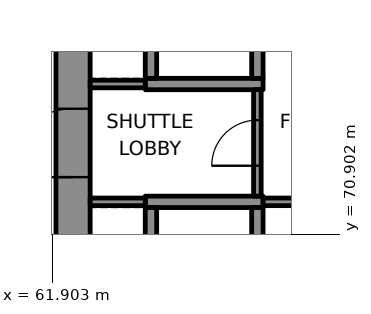
"""IFC4 building model, lengths in metres.
Left out: names, types, materials, properties, quantities, classifications, styles, units other than length and angle.
Written with IfcOpenShell. Run it as: python <this file> out.ifc"""

import sys

from ifc_helpers import new_model, si_unit, direction, frame, frame_2d, origin, place, context, subcontext, project, spatial, rectangle, extrude, element, fill, save


model = new_model("IFC4")
c1 = context("Model", 3, precision=1e-05, world=origin(), true_north=direction((0.0, 1.0)))
c2 = subcontext(c1, "Body", "Model", "MODEL_VIEW")
j1 = project(units=[si_unit("LENGTHUNIT", "METRE"), si_unit("PLANEANGLEUNIT", "RADIAN")], contexts=[c1])
p1 = place(None, origin())
s1 = spatial("IfcSite", under=j1, at=p1, CompositionType="ELEMENT")
p2 = place(p1, origin())
s2 = spatial("IfcBuilding", under=s1, at=p2, CompositionType="ELEMENT")
p3 = place(p2, frame((0.0, 0.0, 31.0)))
s3 = spatial("IfcBuildingStorey", under=s2, at=p3, CompositionType="ELEMENT", Elevation=31.0)
p4 = place(p3, frame((62.45, 66.9, 0.0), z_axis=(0.0, 0.0, 1.0), x_axis=(0.0, 1.0, 0.0)))
e1 = element("IfcWall", 1, at=p4, inside=s3, PredefinedType="SHEAR", context=c2, shape_type="SweptSolid", body=[
    extrude(rectangle(XDim=16.2, YDim=0.9, at=frame_2d((8.1, 0.0))), origin(), (0.0, 0.0, 1.0), 4.05),
])
p5 = place(p4, frame((5.5, 0.0, 0.0)))
e2 = element("IfcOpeningElement", 2, at=p5, cuts=e1, PredefinedType="OPENING", context=c2, shape_type="SweptSolid", body=[
    extrude(rectangle(XDim=1.8, YDim=2.1, at=frame_2d((0.9, 1.05))), frame((0.0, 0.46, 0.0), z_axis=(0.0, -1.0, 0.0), x_axis=(1.0, 0.0, 0.0)), (0.0, 0.0, 1.0), 0.92),
])
for number, where, z_axis, x_axis in (
    (3, (64.35, 71.75, 0.0), (0.0, 0.0, 1.0), (1.0, 0.0, 0.0)),
    (4, (64.35, 74.85, 0.0), (0.0, 0.0, 1.0), (1.0, 0.0, 0.0)),
):
    element("IfcWall", number, at=place(p3, frame(where, z_axis=z_axis, x_axis=x_axis)), inside=s3, PredefinedType="SHEAR", context=c2, shape_type="SweptSolid", body=[
        extrude(rectangle(XDim=3.1, YDim=0.3, at=frame_2d((1.55, 0.0))), origin(), (0.0, 0.0, 1.0), 4.05),
    ])
for number, where, z_axis, x_axis in (
    (5, (64.5, 69.0, 0.0), (0.0, 0.0, 1.0), (0.0, 1.0, 0.0)),
    (6, (64.5, 75.0, 0.0), (0.0, 0.0, 1.0), (0.0, 1.0, 0.0)),
    (7, (67.3, 69.0, 0.0), (0.0, 0.0, 1.0), (0.0, 1.0, 0.0)),
    (8, (67.3, 75.0, 0.0), (0.0, 0.0, 1.0), (0.0, 1.0, 0.0)),
):
    element("IfcWall", number, at=place(p3, frame(where, z_axis=z_axis, x_axis=x_axis)), inside=s3, PredefinedType="SHEAR", context=c2, shape_type="SweptSolid", body=[
        extrude(rectangle(XDim=2.6, YDim=0.3, at=frame_2d((1.3, 0.0))), origin(), (0.0, 0.0, 1.0), 4.05),
    ])
p6 = place(p3, frame((71.348, 110.424, 0.0), z_axis=(0.0, 0.0, 1.0), x_axis=(-0.500000550228, -0.86602508611, 0.0)))
e9 = element("IfcWall", 9, at=p6, inside=s3, PredefinedType="SOLIDWALL", context=c2, shape_type="SweptSolid", body=[
    extrude(rectangle(XDim=57.704, YDim=0.3, at=frame_2d((28.852, 0.0))), origin(), (0.0, 0.0, 1.0), 4.05),
])
p7 = place(p6, frame((0.89, 0.0, 0.8)))
e10 = element("IfcOpeningElement", 10, at=p7, cuts=e9, PredefinedType="OPENING", context=c2, shape_type="SweptSolid", body=[
    extrude(rectangle(XDim=3.0, YDim=2.4, at=frame_2d((1.5, 1.2))), frame((0.0, 0.16, 0.0), z_axis=(0.0, -1.0, 0.0), x_axis=(1.0, 0.0, 0.0)), (0.0, 0.0, 1.0), 0.32),
])
p8 = place(p6, frame((4.67, 0.0, 0.8)))
e11 = element("IfcOpeningElement", 11, at=p8, cuts=e9, PredefinedType="OPENING", context=c2, shape_type="SweptSolid", body=[
    extrude(rectangle(XDim=3.0, YDim=2.4, at=frame_2d((1.5, 1.2))), frame((0.0, 0.16, 0.0), z_axis=(0.0, -1.0, 0.0), x_axis=(1.0, 0.0, 0.0)), (0.0, 0.0, 1.0), 0.32),
])
p9 = place(p6, frame((8.451, 0.0, 0.8)))
e12 = element("IfcOpeningElement", 12, at=p9, cuts=e9, PredefinedType="OPENING", context=c2, shape_type="SweptSolid", body=[
    extrude(rectangle(XDim=3.0, YDim=2.4, at=frame_2d((1.5, 1.2))), frame((0.0, 0.16, 0.0), z_axis=(0.0, -1.0, 0.0), x_axis=(1.0, 0.0, 0.0)), (0.0, 0.0, 1.0), 0.32),
])
p10 = place(p6, frame((12.231, 0.0, 0.8)))
e13 = element("IfcOpeningElement", 13, at=p10, cuts=e9, PredefinedType="OPENING", context=c2, shape_type="SweptSolid", body=[
    extrude(rectangle(XDim=3.0, YDim=2.4, at=frame_2d((1.5, 1.2))), frame((0.0, 0.16, 0.0), z_axis=(0.0, -1.0, 0.0), x_axis=(1.0, 0.0, 0.0)), (0.0, 0.0, 1.0), 0.32),
])
p11 = place(p6, frame((16.011, 0.0, 0.8)))
e14 = element("IfcOpeningElement", 14, at=p11, cuts=e9, PredefinedType="OPENING", context=c2, shape_type="SweptSolid", body=[
    extrude(rectangle(XDim=3.0, YDim=2.4, at=frame_2d((1.5, 1.2))), frame((0.0, 0.16, 0.0), z_axis=(0.0, -1.0, 0.0), x_axis=(1.0, 0.0, 0.0)), (0.0, 0.0, 1.0), 0.32),
])
p12 = place(p6, frame((19.792, 0.0, 0.8)))
e15 = element("IfcOpeningElement", 15, at=p12, cuts=e9, PredefinedType="OPENING", context=c2, shape_type="SweptSolid", body=[
    extrude(rectangle(XDim=3.0, YDim=2.4, at=frame_2d((1.5, 1.2))), frame((0.0, 0.16, 0.0), z_axis=(0.0, -1.0, 0.0), x_axis=(1.0, 0.0, 0.0)), (0.0, 0.0, 1.0), 0.32),
])
p13 = place(p6, frame((23.572, 0.0, 0.8)))
e16 = element("IfcOpeningElement", 16, at=p13, cuts=e9, PredefinedType="OPENING", context=c2, shape_type="SweptSolid", body=[
    extrude(rectangle(XDim=3.0, YDim=2.4, at=frame_2d((1.5, 1.2))), frame((0.0, 0.16, 0.0), z_axis=(0.0, -1.0, 0.0), x_axis=(1.0, 0.0, 0.0)), (0.0, 0.0, 1.0), 0.32),
])
p14 = place(p6, frame((27.352, 0.0, 0.8)))
e17 = element("IfcOpeningElement", 17, at=p14, cuts=e9, PredefinedType="OPENING", context=c2, shape_type="SweptSolid", body=[
    extrude(rectangle(XDim=3.0, YDim=2.4, at=frame_2d((1.5, 1.2))), frame((0.0, 0.16, 0.0), z_axis=(0.0, -1.0, 0.0), x_axis=(1.0, 0.0, 0.0)), (0.0, 0.0, 1.0), 0.32),
])
p15 = place(p6, frame((31.132, 0.0, 0.8)))
e18 = element("IfcOpeningElement", 18, at=p15, cuts=e9, PredefinedType="OPENING", context=c2, shape_type="SweptSolid", body=[
    extrude(rectangle(XDim=3.0, YDim=2.4, at=frame_2d((1.5, 1.2))), frame((0.0, 0.16, 0.0), z_axis=(0.0, -1.0, 0.0), x_axis=(1.0, 0.0, 0.0)), (0.0, 0.0, 1.0), 0.32),
])
p16 = place(p6, frame((34.913, 0.0, 0.8)))
e19 = element("IfcOpeningElement", 19, at=p16, cuts=e9, PredefinedType="OPENING", context=c2, shape_type="SweptSolid", body=[
    extrude(rectangle(XDim=3.0, YDim=2.4, at=frame_2d((1.5, 1.2))), frame((0.0, 0.16, 0.0), z_axis=(0.0, -1.0, 0.0), x_axis=(1.0, 0.0, 0.0)), (0.0, 0.0, 1.0), 0.32),
])
p17 = place(p6, frame((38.693, 0.0, 0.8)))
e20 = element("IfcOpeningElement", 20, at=p17, cuts=e9, PredefinedType="OPENING", context=c2, shape_type="SweptSolid", body=[
    extrude(rectangle(XDim=3.0, YDim=2.4, at=frame_2d((1.5, 1.2))), frame((0.0, 0.16, 0.0), z_axis=(0.0, -1.0, 0.0), x_axis=(1.0, 0.0, 0.0)), (0.0, 0.0, 1.0), 0.32),
])
p18 = place(p6, frame((42.473, 0.0, 0.8)))
e21 = element("IfcOpeningElement", 21, at=p18, cuts=e9, PredefinedType="OPENING", context=c2, shape_type="SweptSolid", body=[
    extrude(rectangle(XDim=3.0, YDim=2.4, at=frame_2d((1.5, 1.2))), frame((0.0, 0.16, 0.0), z_axis=(0.0, -1.0, 0.0), x_axis=(1.0, 0.0, 0.0)), (0.0, 0.0, 1.0), 0.32),
])
p19 = place(p6, frame((46.253, 0.0, 0.8)))
e22 = element("IfcOpeningElement", 22, at=p19, cuts=e9, PredefinedType="OPENING", context=c2, shape_type="SweptSolid", body=[
    extrude(rectangle(XDim=3.0, YDim=2.4, at=frame_2d((1.5, 1.2))), frame((0.0, 0.16, 0.0), z_axis=(0.0, -1.0, 0.0), x_axis=(1.0, 0.0, 0.0)), (0.0, 0.0, 1.0), 0.32),
])
p20 = place(p6, frame((50.033, 0.0, 0.8)))
e23 = element("IfcOpeningElement", 23, at=p20, cuts=e9, PredefinedType="OPENING", context=c2, shape_type="SweptSolid", body=[
    extrude(rectangle(XDim=3.0, YDim=2.4, at=frame_2d((1.5, 1.2))), frame((0.0, 0.16, 0.0), z_axis=(0.0, -1.0, 0.0), x_axis=(1.0, 0.0, 0.0)), (0.0, 0.0, 1.0), 0.32),
])
p21 = place(p6, frame((53.814, 0.0, 0.8)))
e24 = element("IfcOpeningElement", 24, at=p21, cuts=e9, PredefinedType="OPENING", context=c2, shape_type="SweptSolid", body=[
    extrude(rectangle(XDim=3.0, YDim=2.4, at=frame_2d((1.5, 1.2))), frame((0.0, 0.16, 0.0), z_axis=(0.0, -1.0, 0.0), x_axis=(1.0, 0.0, 0.0)), (0.0, 0.0, 1.0), 0.32),
])
p22 = place(p3, frame((62.9, 71.75, 0.0), z_axis=(0.0, 0.0, 1.0), x_axis=(1.0, 0.0, 0.0)))
e25 = element("IfcWall", 25, at=p22, inside=s3, PredefinedType="PARTITIONING", context=c2, shape_type="SweptSolid", body=[
    extrude(rectangle(XDim=1.45, YDim=0.2, at=frame_2d((0.725, 0.0))), origin(), (0.0, 0.0, 1.0), 4.05),
])
p23 = place(p3, frame((67.45, 71.75, 0.0), z_axis=(0.0, 0.0, 1.0), x_axis=(1.0, 0.0, 0.0)))
e26 = element("IfcWall", 26, at=p23, inside=s3, PredefinedType="PARTITIONING", context=c2, shape_type="SweptSolid", body=[
    extrude(rectangle(XDim=2.85, YDim=0.2, at=frame_2d((1.425, 0.0))), origin(), (0.0, 0.0, 1.0), 4.05),
])
p24 = place(p3, frame((62.9, 74.85, 0.0), z_axis=(0.0, 0.0, 1.0), x_axis=(1.0, 0.0, 0.0)))
e27 = element("IfcWall", 27, at=p24, inside=s3, PredefinedType="PARTITIONING", context=c2, shape_type="SweptSolid", body=[
    extrude(rectangle(XDim=1.45, YDim=0.2, at=frame_2d((0.725, 0.0))), origin(), (0.0, 0.0, 1.0), 4.05),
])
p25 = place(p3, frame((67.3, 71.9, 0.0), z_axis=(0.0, 0.0, 1.0), x_axis=(0.0, 1.0, 0.0)))
e28 = element("IfcWall", 28, at=p25, inside=s3, PredefinedType="PARTITIONING", context=c2, shape_type="SweptSolid", body=[
    extrude(rectangle(XDim=2.8, YDim=0.2, at=frame_2d((1.4, 0.0))), origin(), (0.0, 0.0, 1.0), 4.05),
])
p26 = place(p25, frame((0.8, 0.0, 0.0)))
e29 = element("IfcOpeningElement", 29, at=p26, cuts=e28, PredefinedType="OPENING", context=c2, shape_type="SweptSolid", body=[
    extrude(rectangle(XDim=1.2, YDim=2.1, at=frame_2d((0.6, 1.05))), frame((0.0, 0.11, 0.0), z_axis=(0.0, -1.0, 0.0), x_axis=(1.0, 0.0, 0.0)), (0.0, 0.0, 1.0), 0.22),
])
p27 = place(p26, origin())
e30 = element("IfcDoor", 30, at=p27, inside=s3, OperationType="SINGLE_SWING_RIGHT", PredefinedType="DOOR", context=c2, shape_type="SweptSolid", body=[
    extrude(rectangle(XDim=1.2, YDim=2.1, at=frame_2d((0.6, 1.05))), frame((0.0, 0.025, 0.0), z_axis=(0.0, -1.0, 0.0), x_axis=(1.0, 0.0, 0.0)), (0.0, 0.0, 1.0), 0.05),
])
fill(e29, e30)
p28 = place(p5, origin())
e31 = element("IfcDoor", 31, at=p28, inside=s3, OperationType="SINGLE_SWING_LEFT", PredefinedType="DOOR", context=c2, shape_type="SweptSolid", body=[
    extrude(rectangle(XDim=1.8, YDim=2.1, at=frame_2d((0.9, 1.05))), frame((0.0, 0.17, 0.0), z_axis=(0.0, -1.0, 0.0), x_axis=(1.0, 0.0, 0.0)), (0.0, 0.0, 1.0), 0.34),
])
fill(e2, e31)
save(model, sys.argv[1])
